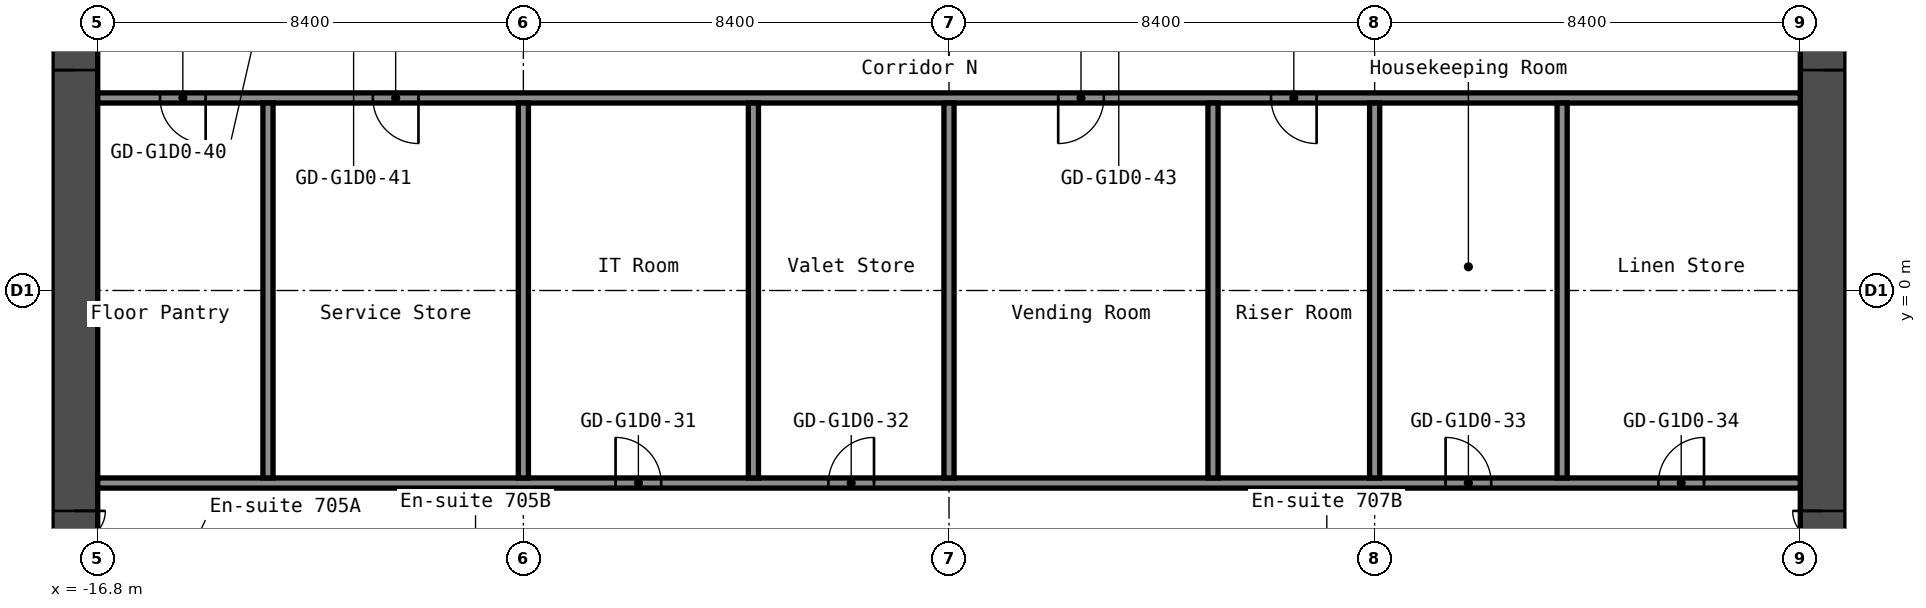
"""IFC4 building model, lengths in metres.
Left out: names, types, materials, properties, quantities, classifications, styles, units other than length and angle.
Written with IfcOpenShell. Run it as: python <this file> out.ifc"""

import sys

from ifc_helpers import new_model, si_unit, direction, frame, frame_2d, origin, place, context, subcontext, project, spatial, rectangle, extrude, element, fill, save


model = new_model("IFC4")
c1 = context("Model", 3, precision=1e-05, world=origin(), true_north=direction((0.0, 1.0)))
c2 = subcontext(c1, "Body", "Model", "MODEL_VIEW")
j1 = project(units=[si_unit("LENGTHUNIT", "METRE"), si_unit("PLANEANGLEUNIT", "RADIAN")], contexts=[c1])
p1 = place(None, origin())
s1 = spatial("IfcSite", under=j1, at=p1, CompositionType="ELEMENT")
p2 = place(p1, origin())
s2 = spatial("IfcBuilding", under=s1, at=p2, CompositionType="ELEMENT")
p3 = place(p2, frame((0.0, 0.0, 29.4)))
s3 = spatial("IfcBuildingStorey", under=s2, at=p3, CompositionType="ELEMENT", Elevation=29.4)
p4 = place(p3, frame((-17.25, -8.4, 0.0), z_axis=(0.0, 0.0, 1.0), x_axis=(0.0, 1.0, 0.0)))
e1 = element("IfcWall", 1, at=p4, inside=s3, PredefinedType="SHEAR", context=c2, shape_type="SweptSolid", body=[
    extrude(rectangle(XDim=16.8, YDim=0.9, at=frame_2d((8.4, 0.0))), origin(), (0.0, 0.0, 1.0), 2.8),
])
p5 = place(p4, frame((12.75, 0.0, 0.0)))
e2 = element("IfcOpeningElement", 2, at=p5, cuts=e1, PredefinedType="OPENING", context=c2, shape_type="SweptSolid", body=[
    extrude(rectangle(XDim=1.2, YDim=2.1, at=frame_2d((0.6, 1.05))), frame((0.0, 0.46, 0.0), z_axis=(0.0, -1.0, 0.0), x_axis=(1.0, 0.0, 0.0)), (0.0, 0.0, 1.0), 0.92),
])
p6 = place(p4, frame((2.85, 0.0, 0.0)))
e3 = element("IfcOpeningElement", 3, at=p6, cuts=e1, PredefinedType="OPENING", context=c2, shape_type="SweptSolid", body=[
    extrude(rectangle(XDim=1.2, YDim=2.1, at=frame_2d((0.6, 1.05))), frame((0.0, 0.46, 0.0), z_axis=(0.0, -1.0, 0.0), x_axis=(1.0, 0.0, 0.0)), (0.0, 0.0, 1.0), 0.92),
])
p7 = place(p3, frame((17.25, -8.4, 0.0), z_axis=(0.0, 0.0, 1.0), x_axis=(0.0, 1.0, 0.0)))
e4 = element("IfcWall", 4, at=p7, inside=s3, PredefinedType="SHEAR", context=c2, shape_type="SweptSolid", body=[
    extrude(rectangle(XDim=16.8, YDim=0.9, at=frame_2d((8.4, 0.0))), origin(), (0.0, 0.0, 1.0), 2.8),
])
p8 = place(p7, frame((12.75, 0.0, 0.0)))
e5 = element("IfcOpeningElement", 5, at=p8, cuts=e4, PredefinedType="OPENING", context=c2, shape_type="SweptSolid", body=[
    extrude(rectangle(XDim=1.2, YDim=2.1, at=frame_2d((0.6, 1.05))), frame((0.0, 0.46, 0.0), z_axis=(0.0, -1.0, 0.0), x_axis=(1.0, 0.0, 0.0)), (0.0, 0.0, 1.0), 0.92),
])
p9 = place(p7, frame((2.85, 0.0, 0.0)))
e6 = element("IfcOpeningElement", 6, at=p9, cuts=e4, PredefinedType="OPENING", context=c2, shape_type="SweptSolid", body=[
    extrude(rectangle(XDim=1.2, YDim=2.1, at=frame_2d((0.6, 1.05))), frame((0.0, 0.46, 0.0), z_axis=(0.0, -1.0, 0.0), x_axis=(1.0, 0.0, 0.0)), (0.0, 0.0, 1.0), 0.92),
])
p10 = place(p3, frame((-16.8, -3.8, 0.0), z_axis=(0.0, 0.0, 1.0), x_axis=(1.0, 0.0, 0.0)))
e7 = element("IfcWall", 7, at=p10, inside=s3, PredefinedType="PARTITIONING", context=c2, shape_type="SweptSolid", body=[
    extrude(rectangle(XDim=33.6, YDim=0.2, at=frame_2d((16.8, 0.0))), origin(), (0.0, 0.0, 1.0), 2.8),
])
p11 = place(p10, frame((10.22, 0.0, 0.0)))
e8 = element("IfcOpeningElement", 8, at=p11, cuts=e7, PredefinedType="OPENING", context=c2, shape_type="SweptSolid", body=[
    extrude(rectangle(XDim=0.9, YDim=2.1, at=frame_2d((0.45, 1.05))), frame((0.0, 0.11, 0.0), z_axis=(0.0, -1.0, 0.0), x_axis=(1.0, 0.0, 0.0)), (0.0, 0.0, 1.0), 0.22),
])
p12 = place(p10, frame((14.42, 0.0, 0.0)))
e9 = element("IfcOpeningElement", 9, at=p12, cuts=e7, PredefinedType="OPENING", context=c2, shape_type="SweptSolid", body=[
    extrude(rectangle(XDim=0.9, YDim=2.1, at=frame_2d((0.45, 1.05))), frame((0.0, 0.11, 0.0), z_axis=(0.0, -1.0, 0.0), x_axis=(1.0, 0.0, 0.0)), (0.0, 0.0, 1.0), 0.22),
])
p13 = place(p10, frame((26.6, 0.0, 0.0)))
e10 = element("IfcOpeningElement", 10, at=p13, cuts=e7, PredefinedType="OPENING", context=c2, shape_type="SweptSolid", body=[
    extrude(rectangle(XDim=0.9, YDim=2.1, at=frame_2d((0.45, 1.05))), frame((0.0, 0.11, 0.0), z_axis=(0.0, -1.0, 0.0), x_axis=(1.0, 0.0, 0.0)), (0.0, 0.0, 1.0), 0.22),
])
p14 = place(p10, frame((30.8, 0.0, 0.0)))
e11 = element("IfcOpeningElement", 11, at=p14, cuts=e7, PredefinedType="OPENING", context=c2, shape_type="SweptSolid", body=[
    extrude(rectangle(XDim=0.9, YDim=2.1, at=frame_2d((0.45, 1.05))), frame((0.0, 0.11, 0.0), z_axis=(0.0, -1.0, 0.0), x_axis=(1.0, 0.0, 0.0)), (0.0, 0.0, 1.0), 0.22),
])
p15 = place(p3, frame((-16.8, 3.8, 0.0), z_axis=(0.0, 0.0, 1.0), x_axis=(1.0, 0.0, 0.0)))
e12 = element("IfcWall", 12, at=p15, inside=s3, PredefinedType="PARTITIONING", context=c2, shape_type="SweptSolid", body=[
    extrude(rectangle(XDim=33.6, YDim=0.2, at=frame_2d((16.8, 0.0))), origin(), (0.0, 0.0, 1.0), 2.8),
])
p16 = place(p15, frame((1.23, 0.0, 0.0)))
e13 = element("IfcOpeningElement", 13, at=p16, cuts=e12, PredefinedType="OPENING", context=c2, shape_type="SweptSolid", body=[
    extrude(rectangle(XDim=0.9, YDim=2.1, at=frame_2d((0.45, 1.05))), frame((0.0, 0.11, 0.0), z_axis=(0.0, -1.0, 0.0), x_axis=(1.0, 0.0, 0.0)), (0.0, 0.0, 1.0), 0.22),
])
p17 = place(p15, frame((5.43, 0.0, 0.0)))
e14 = element("IfcOpeningElement", 14, at=p17, cuts=e12, PredefinedType="OPENING", context=c2, shape_type="SweptSolid", body=[
    extrude(rectangle(XDim=0.9, YDim=2.1, at=frame_2d((0.45, 1.05))), frame((0.0, 0.11, 0.0), z_axis=(0.0, -1.0, 0.0), x_axis=(1.0, 0.0, 0.0)), (0.0, 0.0, 1.0), 0.22),
])
p18 = place(p15, frame((18.955, 0.0, 0.0)))
e15 = element("IfcOpeningElement", 15, at=p18, cuts=e12, PredefinedType="OPENING", context=c2, shape_type="SweptSolid", body=[
    extrude(rectangle(XDim=0.9, YDim=2.1, at=frame_2d((0.45, 1.05))), frame((0.0, 0.11, 0.0), z_axis=(0.0, -1.0, 0.0), x_axis=(1.0, 0.0, 0.0)), (0.0, 0.0, 1.0), 0.22),
])
p19 = place(p15, frame((23.155, 0.0, 0.0)))
e16 = element("IfcOpeningElement", 16, at=p19, cuts=e12, PredefinedType="OPENING", context=c2, shape_type="SweptSolid", body=[
    extrude(rectangle(XDim=0.9, YDim=2.1, at=frame_2d((0.45, 1.05))), frame((0.0, 0.11, 0.0), z_axis=(0.0, -1.0, 0.0), x_axis=(1.0, 0.0, 0.0)), (0.0, 0.0, 1.0), 0.22),
])
for number, where, z_axis, x_axis in (
    (17, (-13.44, -3.7, 0.0), (0.0, 0.0, 1.0), (0.0, 1.0, 0.0)),
    (18, (-8.4, -3.7, 0.0), (0.0, 0.0, 1.0), (0.0, 1.0, 0.0)),
    (19, (-3.86, -3.7, 0.0), (0.0, 0.0, 1.0), (0.0, 1.0, 0.0)),
    (20, (0.0, -3.7, 0.0), (0.0, 0.0, 1.0), (0.0, 1.0, 0.0)),
    (21, (5.21, -3.7, 0.0), (0.0, 0.0, 1.0), (0.0, 1.0, 0.0)),
    (22, (8.4, -3.7, 0.0), (0.0, 0.0, 1.0), (0.0, 1.0, 0.0)),
    (23, (12.1, -3.7, 0.0), (0.0, 0.0, 1.0), (0.0, 1.0, 0.0)),
):
    element("IfcWall", number, at=place(p3, frame(where, z_axis=z_axis, x_axis=x_axis)), inside=s3, PredefinedType="PARTITIONING", context=c2, shape_type="SweptSolid", body=[
        extrude(rectangle(XDim=7.4, YDim=0.2, at=frame_2d((3.7, 0.0))), origin(), (0.0, 0.0, 1.0), 2.8),
    ])
p20 = place(p5, origin())
e24 = element("IfcDoor", 24, at=p20, inside=s3, OperationType="DOUBLE_DOOR_SINGLE_SWING", PredefinedType="DOOR", context=c2, shape_type="SweptSolid", body=[
    extrude(rectangle(XDim=1.2, YDim=2.1, at=frame_2d((0.6, 1.05))), frame((0.0, 0.025, 0.0), z_axis=(0.0, -1.0, 0.0), x_axis=(1.0, 0.0, 0.0)), (0.0, 0.0, 1.0), 0.05),
])
fill(e2, e24)
p21 = place(p6, origin())
e25 = element("IfcDoor", 25, at=p21, inside=s3, OperationType="DOUBLE_DOOR_SINGLE_SWING", PredefinedType="DOOR", context=c2, shape_type="SweptSolid", body=[
    extrude(rectangle(XDim=1.2, YDim=2.1, at=frame_2d((0.6, 1.05))), frame((0.0, 0.025, 0.0), z_axis=(0.0, -1.0, 0.0), x_axis=(1.0, 0.0, 0.0)), (0.0, 0.0, 1.0), 0.05),
])
fill(e3, e25)
p22 = place(p8, origin())
e26 = element("IfcDoor", 26, at=p22, inside=s3, OperationType="DOUBLE_DOOR_SINGLE_SWING", PredefinedType="DOOR", context=c2, shape_type="SweptSolid", body=[
    extrude(rectangle(XDim=1.2, YDim=2.1, at=frame_2d((0.6, 1.05))), frame((0.0, 0.025, 0.0), z_axis=(0.0, -1.0, 0.0), x_axis=(1.0, 0.0, 0.0)), (0.0, 0.0, 1.0), 0.05),
])
fill(e5, e26)
p23 = place(p9, origin())
e27 = element("IfcDoor", 27, at=p23, inside=s3, OperationType="DOUBLE_DOOR_SINGLE_SWING", PredefinedType="DOOR", context=c2, shape_type="SweptSolid", body=[
    extrude(rectangle(XDim=1.2, YDim=2.1, at=frame_2d((0.6, 1.05))), frame((0.0, 0.025, 0.0), z_axis=(0.0, -1.0, 0.0), x_axis=(1.0, 0.0, 0.0)), (0.0, 0.0, 1.0), 0.05),
])
fill(e6, e27)
p24 = place(p11, origin())
e28 = element("IfcDoor", 28, at=p24, inside=s3, OperationType="SINGLE_SWING_RIGHT", PredefinedType="DOOR", context=c2, shape_type="SweptSolid", body=[
    extrude(rectangle(XDim=0.9, YDim=2.1, at=frame_2d((0.45, 1.05))), frame((0.0, 0.025, 0.0), z_axis=(0.0, -1.0, 0.0), x_axis=(1.0, 0.0, 0.0)), (0.0, 0.0, 1.0), 0.05),
])
fill(e8, e28)
p25 = place(p12, origin())
e29 = element("IfcDoor", 29, at=p25, inside=s3, OperationType="SINGLE_SWING_LEFT", PredefinedType="DOOR", context=c2, shape_type="SweptSolid", body=[
    extrude(rectangle(XDim=0.9, YDim=2.1, at=frame_2d((0.45, 1.05))), frame((0.0, 0.025, 0.0), z_axis=(0.0, -1.0, 0.0), x_axis=(1.0, 0.0, 0.0)), (0.0, 0.0, 1.0), 0.05),
])
fill(e9, e29)
p26 = place(p13, origin())
e30 = element("IfcDoor", 30, at=p26, inside=s3, OperationType="SINGLE_SWING_RIGHT", PredefinedType="DOOR", context=c2, shape_type="SweptSolid", body=[
    extrude(rectangle(XDim=0.9, YDim=2.1, at=frame_2d((0.45, 1.05))), frame((0.0, 0.025, 0.0), z_axis=(0.0, -1.0, 0.0), x_axis=(1.0, 0.0, 0.0)), (0.0, 0.0, 1.0), 0.05),
])
fill(e10, e30)
p27 = place(p14, origin())
e31 = element("IfcDoor", 31, at=p27, inside=s3, OperationType="SINGLE_SWING_LEFT", PredefinedType="DOOR", context=c2, shape_type="SweptSolid", body=[
    extrude(rectangle(XDim=0.9, YDim=2.1, at=frame_2d((0.45, 1.05))), frame((0.0, 0.025, 0.0), z_axis=(0.0, -1.0, 0.0), x_axis=(1.0, 0.0, 0.0)), (0.0, 0.0, 1.0), 0.05),
])
fill(e11, e31)
p28 = place(p16, origin())
e32 = element("IfcDoor", 32, at=p28, inside=s3, OperationType="SINGLE_SWING_RIGHT", PredefinedType="DOOR", context=c2, shape_type="SweptSolid", body=[
    extrude(rectangle(XDim=0.9, YDim=2.1, at=frame_2d((0.45, 1.05))), frame((0.0, 0.025, 0.0), z_axis=(0.0, -1.0, 0.0), x_axis=(1.0, 0.0, 0.0)), (0.0, 0.0, 1.0), 0.05),
])
fill(e13, e32)
p29 = place(p17, origin())
e33 = element("IfcDoor", 33, at=p29, inside=s3, OperationType="SINGLE_SWING_RIGHT", PredefinedType="DOOR", context=c2, shape_type="SweptSolid", body=[
    extrude(rectangle(XDim=0.9, YDim=2.1, at=frame_2d((0.45, 1.05))), frame((0.0, 0.025, 0.0), z_axis=(0.0, -1.0, 0.0), x_axis=(1.0, 0.0, 0.0)), (0.0, 0.0, 1.0), 0.05),
])
fill(e14, e33)
p30 = place(p18, origin())
e34 = element("IfcDoor", 34, at=p30, inside=s3, OperationType="SINGLE_SWING_LEFT", PredefinedType="DOOR", context=c2, shape_type="SweptSolid", body=[
    extrude(rectangle(XDim=0.9, YDim=2.1, at=frame_2d((0.45, 1.05))), frame((0.0, 0.025, 0.0), z_axis=(0.0, -1.0, 0.0), x_axis=(1.0, 0.0, 0.0)), (0.0, 0.0, 1.0), 0.05),
])
fill(e15, e34)
p31 = place(p19, origin())
e35 = element("IfcDoor", 35, at=p31, inside=s3, OperationType="SINGLE_SWING_RIGHT", PredefinedType="DOOR", context=c2, shape_type="SweptSolid", body=[
    extrude(rectangle(XDim=0.9, YDim=2.1, at=frame_2d((0.45, 1.05))), frame((0.0, 0.025, 0.0), z_axis=(0.0, -1.0, 0.0), x_axis=(1.0, 0.0, 0.0)), (0.0, 0.0, 1.0), 0.05),
])
fill(e16, e35)
save(model, sys.argv[1])
